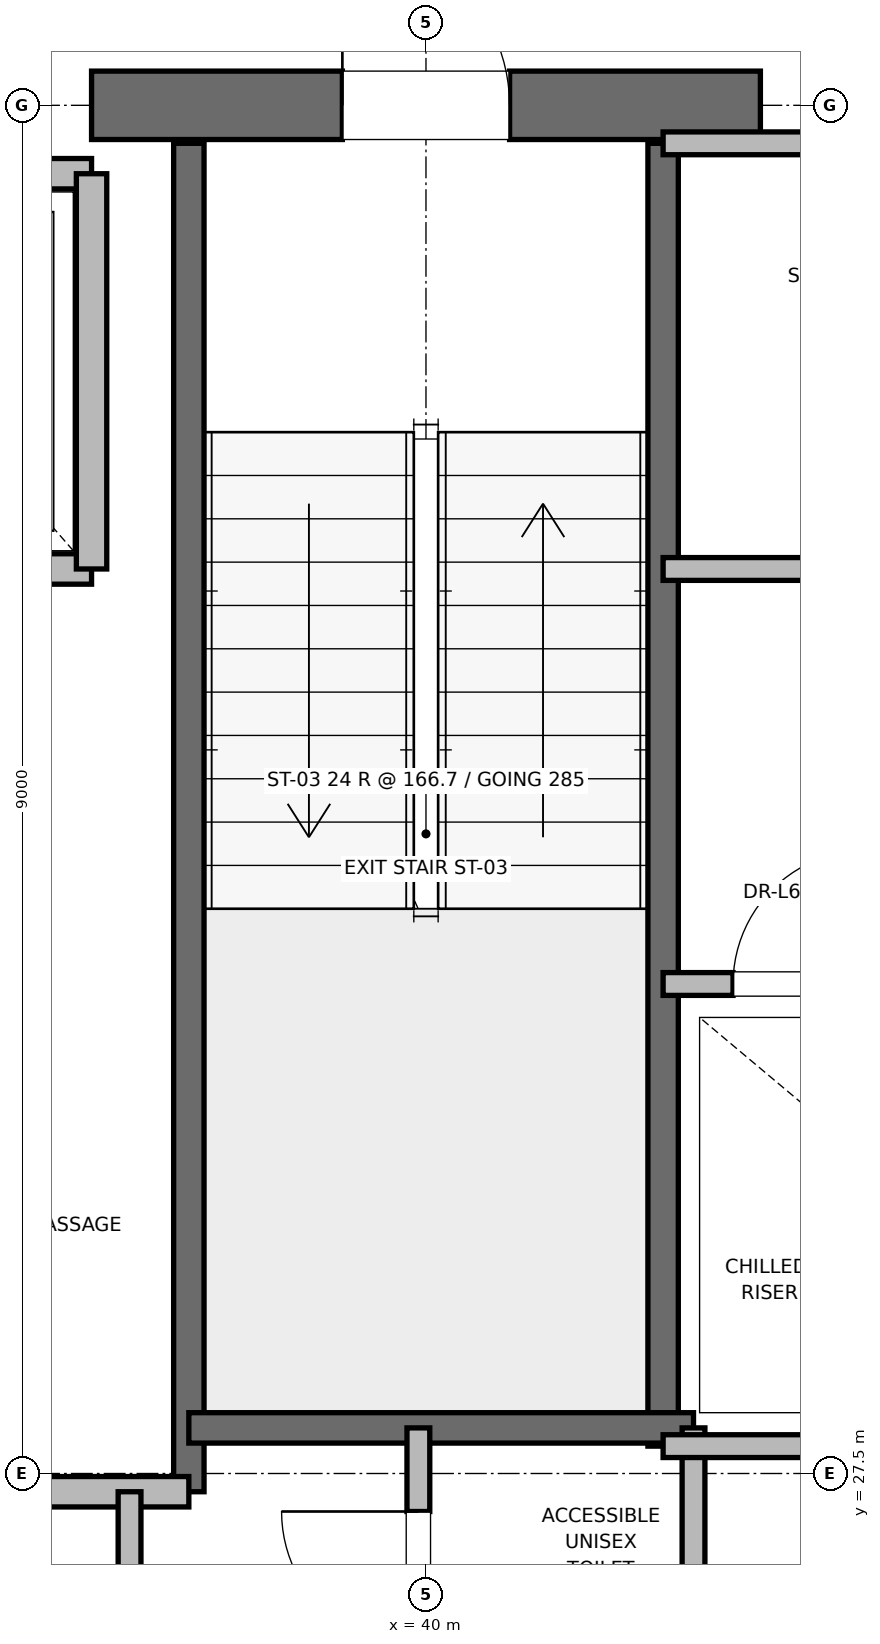
"""IFC4 building model, lengths in metres.
Left out: names, types, materials, properties, quantities, classifications, styles, units other than length and angle.
Written with IfcOpenShell. Run it as: python <this file> out.ifc"""

import sys

from ifc_helpers import new_model, si_unit, direction, frame, frame_2d, origin, place, context, subcontext, project, spatial, rectangle, extrude, element, fill, save


model = new_model("IFC4")
c1 = context("Model", 3, precision=1e-05, world=origin(), true_north=direction((0.0, 1.0)))
c2 = subcontext(c1, "Body", "Model", "MODEL_VIEW")
j1 = project(units=[si_unit("LENGTHUNIT", "METRE"), si_unit("PLANEANGLEUNIT", "RADIAN")], contexts=[c1])
p1 = place(None, origin())
s1 = spatial("IfcSite", under=j1, at=p1, CompositionType="ELEMENT")
p2 = place(p1, origin())
s2 = spatial("IfcBuilding", under=s1, at=p2, CompositionType="ELEMENT")
p3 = place(p2, frame((0.0, 0.0, 291.2)))
s3 = spatial("IfcBuildingStorey", under=s2, at=p3, CompositionType="ELEMENT", Elevation=291.2)
p4 = place(p3, frame((37.8, 36.5, 0.0), z_axis=(0.0, 0.0, 1.0), x_axis=(1.0, 0.0, 0.0)))
e1 = element("IfcWall", 1, at=p4, inside=s3, PredefinedType="SHEAR", context=c2, shape_type="SweptSolid", body=[
    extrude(rectangle(XDim=4.4, YDim=0.45, at=frame_2d((2.2, 0.0))), origin(), (0.0, 0.0, 1.0), 3.7),
])
p5 = place(p4, frame((1.65, 0.0, 0.0)))
e2 = element("IfcOpeningElement", 2, at=p5, cuts=e1, PredefinedType="OPENING", context=c2, shape_type="SweptSolid", body=[
    extrude(rectangle(XDim=1.1, YDim=2.15, at=frame_2d((0.55, 1.075))), frame((0.0, 0.225, 0.0), z_axis=(0.0, -1.0, 0.0), x_axis=(1.0, 0.0, 0.0)), (0.0, 0.0, 1.0), 0.45),
])
p6 = place(p3, frame((38.44, 27.38, 0.0), z_axis=(0.0, 0.0, 1.0), x_axis=(0.0, 1.0, 0.0)))
e3 = element("IfcWall", 3, at=p6, inside=s3, PredefinedType="SOLIDWALL", context=c2, shape_type="SweptSolid", body=[
    extrude(rectangle(XDim=8.87, YDim=0.2, at=frame_2d((4.435, 0.0))), origin(), (0.0, 0.0, 1.0), 3.7),
])
p7 = place(p3, frame((41.56, 27.68, 0.0), z_axis=(0.0, 0.0, 1.0), x_axis=(0.0, 1.0, 0.0)))
e4 = element("IfcWall", 4, at=p7, inside=s3, PredefinedType="SOLIDWALL", context=c2, shape_type="SweptSolid", body=[
    extrude(rectangle(XDim=8.57, YDim=0.2, at=frame_2d((4.285, 0.0))), origin(), (0.0, 0.0, 1.0), 3.7),
])
p8 = place(p3, frame((38.44, 27.8, 0.0), z_axis=(0.0, 0.0, 1.0), x_axis=(1.0, 0.0, 0.0)))
e5 = element("IfcWall", 5, at=p8, inside=s3, PredefinedType="SOLIDWALL", context=c2, shape_type="SweptSolid", body=[
    extrude(rectangle(XDim=3.32, YDim=0.2, at=frame_2d((1.66, 0.0))), origin(), (0.0, 0.0, 1.0), 3.7),
])
p9 = place(p3, frame((32.82, 27.38, 0.0), z_axis=(0.0, 0.0, 1.0), x_axis=(1.0, 0.0, 0.0)))
e6 = element("IfcWall", 6, at=p9, inside=s3, PredefinedType="PARTITIONING", context=c2, shape_type="SweptSolid", body=[
    extrude(rectangle(XDim=5.62, YDim=0.2, at=frame_2d((2.81, 0.0))), origin(), (0.0, 0.0, 1.0), 3.7),
])
p10 = place(p3, frame((35.5, 33.45, 0.0), z_axis=(0.0, 0.0, 1.0), x_axis=(1.0, 0.0, 0.0)))
e7 = element("IfcWall", 7, at=p10, inside=s3, PredefinedType="SOLIDWALL", context=c2, shape_type="SweptSolid", body=[
    extrude(rectangle(XDim=2.3, YDim=0.2, at=frame_2d((1.15, 0.0))), origin(), (0.0, 0.0, 1.0), 3.7),
])
p11 = place(p10, frame((0.6, 0.0, 0.0)))
e8 = element("IfcOpeningElement", 8, at=p11, cuts=e7, PredefinedType="OPENING", context=c2, shape_type="SweptSolid", body=[
    extrude(rectangle(XDim=1.1, YDim=2.2, at=frame_2d((0.55, 1.1))), frame((0.0, 0.1, 0.0), z_axis=(0.0, -1.0, 0.0), x_axis=(1.0, 0.0, 0.0)), (0.0, 0.0, 1.0), 0.2),
])
p12 = place(p3, frame((37.8, 36.05, 0.0), z_axis=(0.0, 0.0, 1.0), x_axis=(-1.0, 0.0, 0.0)))
e9 = element("IfcWall", 9, at=p12, inside=s3, PredefinedType="SOLIDWALL", context=c2, shape_type="SweptSolid", body=[
    extrude(rectangle(XDim=2.3, YDim=0.2, at=frame_2d((1.15, 0.0))), origin(), (0.0, 0.0, 1.0), 2.78),
])
p13 = place(p3, frame((37.8, 33.45, 0.0), z_axis=(0.0, 0.0, 1.0), x_axis=(0.0, 1.0, 0.0)))
e10 = element("IfcWall", 10, at=p13, inside=s3, PredefinedType="SOLIDWALL", context=c2, shape_type="SweptSolid", body=[
    extrude(rectangle(XDim=2.6, YDim=0.2, at=frame_2d((1.3, 0.0))), origin(), (0.0, 0.0, 1.0), 2.78),
])
p14 = place(p3, frame((41.76, 23.8, 0.0), z_axis=(0.0, 0.0, 1.0), x_axis=(0.0, 1.0, 0.0)))
e11 = element("IfcWall", 11, at=p14, inside=s3, PredefinedType="PARTITIONING", context=c2, shape_type="SweptSolid", body=[
    extrude(rectangle(XDim=4.0, YDim=0.15, at=frame_2d((2.0, 0.0))), origin(), (0.0, 0.0, 1.0), 2.85),
])
p15 = place(p3, frame((39.95, 25.8, 0.0), z_axis=(0.0, 0.0, 1.0), x_axis=(0.0, 1.0, 0.0)))
e12 = element("IfcWall", 12, at=p15, inside=s3, PredefinedType="PARTITIONING", context=c2, shape_type="SweptSolid", body=[
    extrude(rectangle(XDim=2.0, YDim=0.15, at=frame_2d((1.0, 0.0))), origin(), (0.0, 0.0, 1.0), 2.85),
])
p16 = place(p15, frame((0.55, 0.0, 0.0)))
e13 = element("IfcOpeningElement", 13, at=p16, cuts=e12, PredefinedType="OPENING", context=c2, shape_type="SweptSolid", body=[
    extrude(rectangle(XDim=0.9, YDim=2.1, at=frame_2d((0.45, 1.05))), frame((0.0, 0.075, 0.0), z_axis=(0.0, -1.0, 0.0), x_axis=(1.0, 0.0, 0.0)), (0.0, 0.0, 1.0), 0.15),
])
p17 = place(p3, frame((38.05, 23.06, 0.0), z_axis=(0.0, 0.0, 1.0), x_axis=(0.0, 1.0, 0.0)))
e14 = element("IfcWall", 14, at=p17, inside=s3, PredefinedType="PARTITIONING", context=c2, shape_type="SweptSolid", body=[
    extrude(rectangle(XDim=4.32, YDim=0.15, at=frame_2d((2.16, 0.0))), origin(), (0.0, 0.0, 1.0), 2.85),
])
p18 = place(p17, frame((1.66, 0.0, 0.0)))
e15 = element("IfcOpeningElement", 15, at=p18, cuts=e14, PredefinedType="OPENING", context=c2, shape_type="SweptSolid", body=[
    extrude(rectangle(XDim=1.0, YDim=2.15, at=frame_2d((0.5, 1.075))), frame((0.0, 0.075, 0.0), z_axis=(0.0, -1.0, 0.0), x_axis=(1.0, 0.0, 0.0)), (0.0, 0.0, 1.0), 0.15),
])
p19 = place(p3, frame((41.56, 27.68, 0.0), z_axis=(0.0, 0.0, 1.0), x_axis=(1.0, 0.0, 0.0)))
e16 = element("IfcWall", 16, at=p19, inside=s3, PredefinedType="PARTITIONING", context=c2, shape_type="SweptSolid", body=[
    extrude(rectangle(XDim=3.59, YDim=0.15, at=frame_2d((1.795, 0.0))), origin(), (0.0, 0.0, 1.0), 2.85),
])
p20 = place(p3, frame((41.56, 30.72, 0.0), z_axis=(0.0, 0.0, 1.0), x_axis=(1.0, 0.0, 0.0)))
e17 = element("IfcWall", 17, at=p20, inside=s3, PredefinedType="PARTITIONING", context=c2, shape_type="SweptSolid", body=[
    extrude(rectangle(XDim=1.8, YDim=0.15, at=frame_2d((0.9, 0.0))), origin(), (0.0, 0.0, 1.0), 2.85),
])
p21 = place(p20, frame((0.46, 0.0, 0.0)))
e18 = element("IfcOpeningElement", 18, at=p21, cuts=e17, PredefinedType="OPENING", context=c2, shape_type="SweptSolid", body=[
    extrude(rectangle(XDim=0.88, YDim=2.1, at=frame_2d((0.44, 1.05))), frame((0.0, 0.075, 0.0), z_axis=(0.0, -1.0, 0.0), x_axis=(1.0, 0.0, 0.0)), (0.0, 0.0, 1.0), 0.15),
])
p22 = place(p3, frame((41.56, 36.25, 0.0), z_axis=(0.0, 0.0, 1.0), x_axis=(1.0, 0.0, 0.0)))
e19 = element("IfcWall", 19, at=p22, inside=s3, PredefinedType="PARTITIONING", context=c2, shape_type="SweptSolid", body=[
    extrude(rectangle(XDim=2.94, YDim=0.15, at=frame_2d((1.47, 0.0))), origin(), (0.0, 0.0, 1.0), 2.78),
])
p23 = place(p3, frame((41.56, 33.45, 0.0), z_axis=(0.0, 0.0, 1.0), x_axis=(1.0, 0.0, 0.0)))
e20 = element("IfcWall", 20, at=p23, inside=s3, PredefinedType="PARTITIONING", context=c2, shape_type="SweptSolid", body=[
    extrude(rectangle(XDim=2.94, YDim=0.15, at=frame_2d((1.47, 0.0))), origin(), (0.0, 0.0, 1.0), 2.85),
])
p24 = place(p23, frame((1.03, 0.0, 0.0)))
e21 = element("IfcOpeningElement", 21, at=p24, cuts=e20, PredefinedType="OPENING", context=c2, shape_type="SweptSolid", body=[
    extrude(rectangle(XDim=0.88, YDim=2.1, at=frame_2d((0.44, 1.05))), frame((0.0, 0.075, 0.0), z_axis=(0.0, -1.0, 0.0), x_axis=(1.0, 0.0, 0.0)), (0.0, 0.0, 1.0), 0.15),
])
p25 = place(p5, origin())
e22 = element("IfcDoor", 22, at=p25, inside=s3, OperationType="SINGLE_SWING_LEFT", PredefinedType="DOOR", context=c2, shape_type="SweptSolid", body=[
    extrude(rectangle(XDim=1.1, YDim=2.15, at=frame_2d((0.55, 1.075))), frame((0.0, 0.025, 0.0), z_axis=(0.0, -1.0, 0.0), x_axis=(1.0, 0.0, 0.0)), (0.0, 0.0, 1.0), 0.05),
])
fill(e2, e22)
p26 = place(p16, origin())
e23 = element("IfcDoor", 23, at=p26, inside=s3, OperationType="SINGLE_SWING_RIGHT", PredefinedType="DOOR", context=c2, shape_type="SweptSolid", body=[
    extrude(rectangle(XDim=0.9, YDim=2.1, at=frame_2d((0.45, 1.05))), frame((0.0, 0.025, 0.0), z_axis=(0.0, -1.0, 0.0), x_axis=(1.0, 0.0, 0.0)), (0.0, 0.0, 1.0), 0.05),
])
fill(e13, e23)
p27 = place(p21, origin())
e24 = element("IfcDoor", 24, at=p27, inside=s3, OperationType="SINGLE_SWING_RIGHT", PredefinedType="DOOR", context=c2, shape_type="SweptSolid", body=[
    extrude(rectangle(XDim=0.88, YDim=2.1, at=frame_2d((0.44, 1.05))), frame((0.0, 0.025, 0.0), z_axis=(0.0, -1.0, 0.0), x_axis=(1.0, 0.0, 0.0)), (0.0, 0.0, 1.0), 0.05),
])
fill(e18, e24)
save(model, sys.argv[1])
